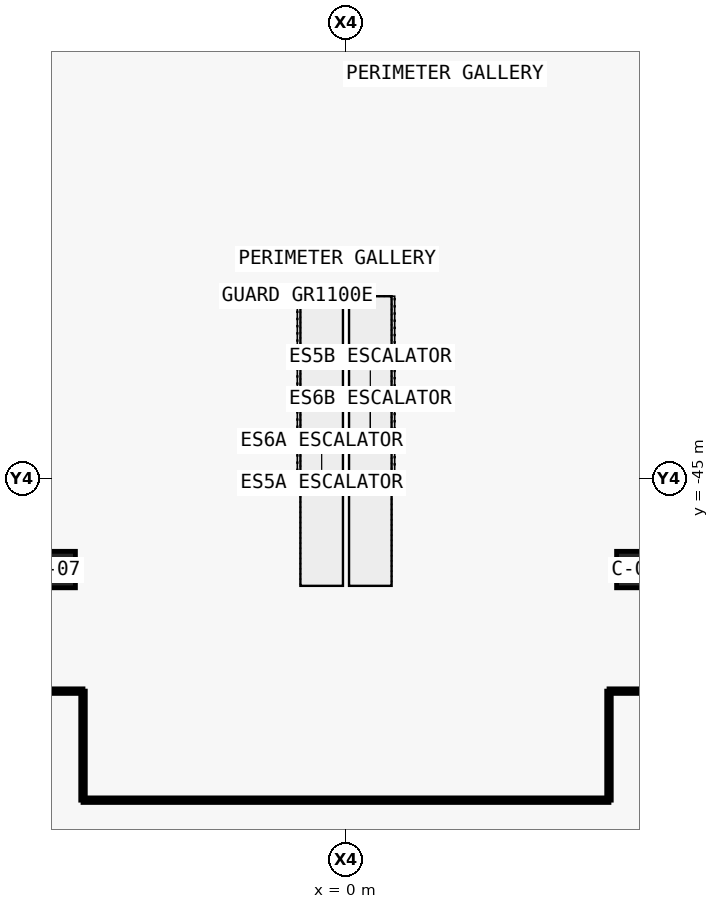
"""IFC4 building model, lengths in metres.
Left out: names, types, materials, properties, quantities, classifications, styles, units other than length and angle.
Written with IfcOpenShell. Run it as: python <this file> out.ifc"""

import sys

from ifc_helpers import new_model, si_unit, direction, frame, frame_2d, origin, origin_2d, place, context, subcontext, project, spatial, rectangle, extrude, element, save


model = new_model("IFC4")
c1 = context("Model", 3, precision=1e-05, world=origin(), true_north=direction((0.0, 1.0)))
c2 = subcontext(c1, "Body", "Model", "MODEL_VIEW")
j1 = project(units=[si_unit("LENGTHUNIT", "METRE"), si_unit("PLANEANGLEUNIT", "RADIAN")], contexts=[c1])
p1 = place(None, origin())
s1 = spatial("IfcSite", under=j1, at=p1, CompositionType="ELEMENT")
p2 = place(p1, origin())
s2 = spatial("IfcBuilding", under=s1, at=p2, CompositionType="ELEMENT")
p3 = place(p2, frame((0.0, 0.0, 37.5)))
s3 = spatial("IfcBuildingStorey", under=s2, at=p3, CompositionType="ELEMENT", Elevation=37.5)
for number, where, z_axis, x_axis in (
    (1, (-9.5, -48.0, 0.0), (0.0, 0.0, 1.0), (1.0, 0.0, 0.0)),
    (2, (9.5, -48.0, 0.0), (0.0, 0.0, 1.0), (1.0, 0.0, 0.0)),
):
    element("IfcColumn", number, at=place(p3, frame(where, z_axis=z_axis, x_axis=x_axis)), inside=s3, PredefinedType="COLUMN", context=c2, shape_type="SweptSolid", body=[
        extrude(rectangle(XDim=1.2, YDim=1.2, at=origin_2d()), origin(), (0.0, 0.0, 1.0), 5.5),
    ])
p4 = place(p3, frame((12.0, -51.999, 0.0), z_axis=(0.0, 0.0, 1.0), x_axis=(-1.0, 0.0, 0.0)))
e3 = element("IfcWall", 3, at=p4, inside=s3, PredefinedType="PARTITIONING", context=c2, shape_type="SweptSolid", body=[
    extrude(rectangle(XDim=3.349, YDim=0.15, at=frame_2d((1.675, 0.0))), origin(), (0.0, 0.0, 1.0), 4.28),
])
p5 = place(p3, frame((-8.651, -51.999, 0.0), z_axis=(0.0, 0.0, 1.0), x_axis=(-1.0, 0.0, 0.0)))
e4 = element("IfcWall", 4, at=p5, inside=s3, PredefinedType="PARTITIONING", context=c2, shape_type="SweptSolid", body=[
    extrude(rectangle(XDim=4.849, YDim=0.15, at=frame_2d((2.425, 0.0))), origin(), (0.0, 0.0, 1.0), 4.28),
])
p6 = place(p3, frame((-30.839, -34.413, 0.0), z_axis=(0.0, 0.0, 1.0), x_axis=(0.819150779762, 0.573578242279, 0.0)))
e5 = element("IfcWall", 5, at=p6, inside=s3, PredefinedType="PARTITIONING", context=c2, shape_type="SweptSolid", body=[
    extrude(rectangle(XDim=27.002, YDim=0.15, at=frame_2d((13.501, 0.0))), origin(), (0.0, 0.0, 1.0), 4.08),
])
p7 = place(p3, frame((8.65, -55.586, 0.0), z_axis=(0.0, 0.0, 1.0), x_axis=(-1.0, 0.0, 0.0)))
e6 = element("IfcWall", 6, at=p7, inside=s3, PredefinedType="PARTITIONING", context=c2, shape_type="SweptSolid", body=[
    extrude(rectangle(XDim=17.3, YDim=0.15, at=frame_2d((8.65, 0.0))), origin(), (0.0, 0.0, 1.0), 5.1),
])
for number, where, z_axis, x_axis in (
    (7, (-8.65, -55.586, 0.0), (0.0, 0.0, 1.0), (0.0, 1.0, 0.0)),
    (8, (8.65, -51.998, 0.0), (0.0, 0.0, 1.0), (0.0, -1.0, 0.0)),
):
    element("IfcWall", number, at=place(p3, frame(where, z_axis=z_axis, x_axis=x_axis)), inside=s3, PredefinedType="PARTITIONING", context=c2, shape_type="SweptSolid", body=[
        extrude(rectangle(XDim=3.588, YDim=0.15, at=frame_2d((1.794, 0.0))), origin(), (0.0, 0.0, 1.0), 4.63),
    ])
save(model, sys.argv[1])
